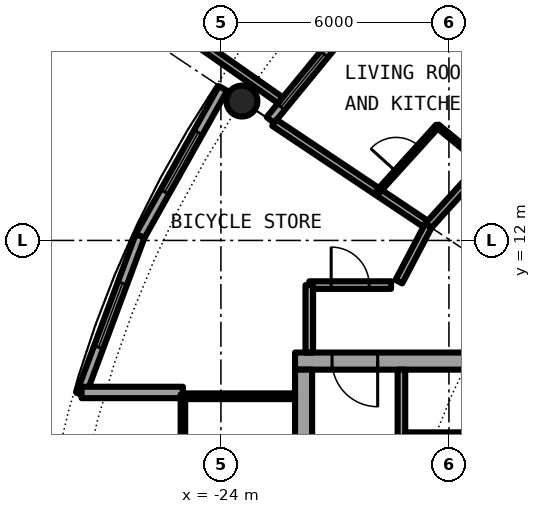
"""IFC4 building model, lengths in metres.
Left out: names, types, materials, properties, quantities, classifications, styles, units other than length and angle.
Written with IfcOpenShell. Run it as: python <this file> out.ifc"""

import sys

from ifc_helpers import new_model, si_unit, direction, frame, frame_2d, origin, origin_2d, place, context, subcontext, project, spatial, rectangle, hollow_circle, extrude, element, fill, save


model = new_model("IFC4")
c1 = context("Model", 3, precision=1e-05, world=origin(), true_north=direction((0.0, 1.0)))
c2 = subcontext(c1, "Body", "Model", "MODEL_VIEW")
j1 = project(units=[si_unit("LENGTHUNIT", "METRE"), si_unit("PLANEANGLEUNIT", "RADIAN")], contexts=[c1])
p1 = place(None, origin())
s1 = spatial("IfcSite", under=j1, at=p1, CompositionType="ELEMENT")
p2 = place(p1, origin())
s2 = spatial("IfcBuilding", under=s1, at=p2, CompositionType="ELEMENT")
p3 = place(p2, frame((0.0, 0.0, 218.8)))
s3 = spatial("IfcBuildingStorey", under=s2, at=p3, CompositionType="ELEMENT", Elevation=218.8)
p4 = place(p3, frame((-23.448, 15.667, 0.0), z_axis=(0.0, 0.0, 1.0), x_axis=(1.0, 0.0, 0.0)))
e1 = element("IfcColumn", 1, at=p4, inside=s3, PredefinedType="COLUMN", context=c2, shape_type="SweptSolid", body=[
    extrude(hollow_circle(Radius=0.406, WallThickness=0.03, at=origin_2d()), origin(), (0.0, 0.0, 1.0), 3.05),
])
p5 = place(p3, frame((-19.304, 19.304, 0.0), z_axis=(0.0, 0.0, 1.0), x_axis=(-0.634382322723, -0.773019449054, 0.0)))
e2 = element("IfcWall", 2, at=p5, inside=s3, PredefinedType="SOLIDWALL", context=c2, shape_type="SweptSolid", body=[
    extrude(rectangle(XDim=5.352, YDim=0.25, at=frame_2d((2.676, 0.0))), origin(), (0.0, 0.0, 1.0), 2.65),
])
p6 = place(p5, frame((0.841, 0.0, 0.0)))
e3 = element("IfcOpeningElement", 3, at=p6, cuts=e2, PredefinedType="OPENING", context=c2, shape_type="SweptSolid", body=[
    extrude(rectangle(XDim=1.0, YDim=2.2, at=frame_2d((0.5, 1.1))), frame((0.0, 0.135, 0.0), z_axis=(0.0, -1.0, 0.0), x_axis=(1.0, 0.0, 0.0)), (0.0, 0.0, 1.0), 0.27),
])
p7 = place(p5, frame((3.111, 0.0, 0.3)))
e4 = element("IfcOpeningElement", 4, at=p7, cuts=e2, PredefinedType="OPENING", context=c2, shape_type="SweptSolid", body=[
    extrude(rectangle(XDim=1.8, YDim=2.1, at=frame_2d((0.9, 1.05))), frame((0.0, 0.135, 0.0), z_axis=(0.0, -1.0, 0.0), x_axis=(1.0, 0.0, 0.0)), (0.0, 0.0, 1.0), 0.27),
])
p8 = place(p3, frame((-22.433, 15.688, -0.03), z_axis=(0.0, 0.0, 1.0), x_axis=(-0.819373043115, 0.573260687834, 0.0)))
e5 = element("IfcWall", 5, at=p8, inside=s3, PredefinedType="SOLIDWALL", context=c2, shape_type="SweptSolid", body=[
    extrude(rectangle(XDim=2.925, YDim=0.2, at=frame_2d((1.463, 0.0))), origin(), (0.0, 0.0, 1.0), 2.68),
])
p9 = place(p3, frame((-23.946, 16.0, 0.0), z_axis=(0.0, 0.0, 1.0), x_axis=(-0.489696356642, -0.871893042919, 0.0)))
e6 = element("IfcWall", 6, at=p9, inside=s3, PredefinedType="SOLIDWALL", context=c2, shape_type="SweptSolid", body=[
    extrude(rectangle(XDim=4.454, YDim=0.25, at=frame_2d((2.227, 0.0))), origin(), (0.0, 0.0, 1.0), 2.65),
])
p10 = place(p9, frame((1.327, 0.0, 0.3)))
e7 = element("IfcOpeningElement", 7, at=p10, cuts=e6, PredefinedType="OPENING", context=c2, shape_type="SweptSolid", body=[
    extrude(rectangle(XDim=1.8, YDim=2.1, at=frame_2d((0.9, 1.05))), frame((0.0, 0.135, 0.0), z_axis=(0.0, -1.0, 0.0), x_axis=(1.0, 0.0, 0.0)), (0.0, 0.0, 1.0), 0.27),
])
p11 = place(p3, frame((-26.127, 12.117, 0.0), z_axis=(0.0, 0.0, 1.0), x_axis=(-0.349247811493, -0.937030397675, 0.0)))
e8 = element("IfcWall", 8, at=p11, inside=s3, PredefinedType="SOLIDWALL", context=c2, shape_type="SweptSolid", body=[
    extrude(rectangle(XDim=4.452, YDim=0.25, at=frame_2d((2.226, 0.0))), origin(), (0.0, 0.0, 1.0), 2.65),
])
p12 = place(p11, frame((1.327, 0.0, 0.3)))
e9 = element("IfcOpeningElement", 9, at=p12, cuts=e8, PredefinedType="OPENING", context=c2, shape_type="SweptSolid", body=[
    extrude(rectangle(XDim=1.8, YDim=2.1, at=frame_2d((0.9, 1.05))), frame((0.0, 0.135, 0.0), z_axis=(0.0, -1.0, 0.0), x_axis=(1.0, 0.0, 0.0)), (0.0, 0.0, 1.0), 0.27),
])
p13 = place(p3, frame((-25.0, 8.0, 0.0), z_axis=(0.0, 0.0, 1.0), x_axis=(-1.0, 0.0, 0.0)))
e10 = element("IfcWall", 10, at=p13, inside=s3, PredefinedType="SOLIDWALL", context=c2, shape_type="SweptSolid", body=[
    extrude(rectangle(XDim=2.667, YDim=0.3, at=frame_2d((1.333, 0.0))), origin(), (0.0, 0.0, 1.0), 2.65),
])
p14 = place(p3, frame((-8.55, 8.825, 0.0), z_axis=(0.0, 0.0, 1.0), x_axis=(-1.0, 0.0, 0.0)))
e11 = element("IfcWall", 11, at=p14, inside=s3, PredefinedType="SHEAR", context=c2, shape_type="SweptSolid", body=[
    extrude(rectangle(XDim=13.5, YDim=0.45, at=frame_2d((6.75, 0.0))), origin(), (0.0, 0.0, 1.0), 3.05),
])
p15 = place(p14, frame((11.325, 0.0, 0.0)))
e12 = element("IfcOpeningElement", 12, at=p15, cuts=e11, PredefinedType="OPENING", context=c2, shape_type="SweptSolid", body=[
    extrude(rectangle(XDim=1.2, YDim=2.3, at=frame_2d((0.6, 1.15))), frame((0.0, 0.235, 0.0), z_axis=(0.0, -1.0, 0.0), x_axis=(1.0, 0.0, 0.0)), (0.0, 0.0, 1.0), 0.47),
])
p16 = place(p3, frame((-21.825, -8.6, 0.0), z_axis=(0.0, 0.0, 1.0), x_axis=(0.0, 1.0, 0.0)))
e13 = element("IfcWall", 13, at=p16, inside=s3, PredefinedType="SHEAR", context=c2, shape_type="SweptSolid", body=[
    extrude(rectangle(XDim=17.2, YDim=0.45, at=frame_2d((8.6, 0.0))), origin(), (0.0, 0.0, 1.0), 3.05),
])
p17 = place(p16, frame((7.7, 0.0, 0.0)))
e14 = element("IfcOpeningElement", 14, at=p17, cuts=e13, PredefinedType="OPENING", context=c2, shape_type="SweptSolid", body=[
    extrude(rectangle(XDim=1.8, YDim=2.3, at=frame_2d((0.9, 1.15))), frame((0.0, 0.235, 0.0), z_axis=(0.0, -1.0, 0.0), x_axis=(1.0, 0.0, 0.0)), (0.0, 0.0, 1.0), 0.47),
])
p18 = place(p3, frame((-19.25, 8.6, 0.0), z_axis=(0.0, 0.0, 1.0), x_axis=(0.0, -1.0, 0.0)))
e15 = element("IfcWall", 15, at=p18, inside=s3, PredefinedType="SOLIDWALL", context=c2, shape_type="SweptSolid", body=[
    extrude(rectangle(XDim=7.025, YDim=0.2, at=frame_2d((3.513, 0.0))), origin(), (0.0, 0.0, 1.0), 2.65),
])
p19 = place(p18, frame((2.35, 0.0, 0.0)))
e16 = element("IfcOpeningElement", 16, at=p19, cuts=e15, PredefinedType="OPENING", context=c2, shape_type="SweptSolid", body=[
    extrude(rectangle(XDim=1.1, YDim=2.3, at=frame_2d((0.55, 1.15))), frame((0.0, 0.11, 0.0), z_axis=(0.0, -1.0, 0.0), x_axis=(1.0, 0.0, 0.0)), (0.0, 0.0, 1.0), 0.22),
])
p20 = place(p3, frame((-15.45, 6.875, 0.0), z_axis=(0.0, 0.0, 1.0), x_axis=(-1.0, 0.0, 0.0)))
e17 = element("IfcWall", 17, at=p20, inside=s3, PredefinedType="PARTITIONING", context=c2, shape_type="SweptSolid", body=[
    extrude(rectangle(XDim=3.7, YDim=0.15, at=frame_2d((1.85, 0.0))), origin(), (0.0, 0.0, 1.0), 2.65),
])
p21 = place(p20, frame((1.4, 0.0, 0.0)))
e18 = element("IfcOpeningElement", 18, at=p21, cuts=e17, PredefinedType="OPENING", context=c2, shape_type="SweptSolid", body=[
    extrude(rectangle(XDim=0.9, YDim=2.3, at=frame_2d((0.45, 1.15))), frame((0.0, 0.085, 0.0), z_axis=(0.0, -1.0, 0.0), x_axis=(1.0, 0.0, 0.0)), (0.0, 0.0, 1.0), 0.17),
])
p22 = place(p3, frame((-22.05, 7.9, 0.0), z_axis=(0.0, 0.0, 1.0), x_axis=(-1.0, 0.0, 0.0)))
e19 = element("IfcWall", 19, at=p22, inside=s3, PredefinedType="PARTITIONING", context=c2, shape_type="SweptSolid", body=[
    extrude(rectangle(XDim=2.89, YDim=0.15, at=frame_2d((1.445, 0.0))), origin(), (0.0, 0.0, 1.0), 2.65),
])
p23 = place(p3, frame((-25.0, 7.95, 0.0), z_axis=(0.0, 0.0, 1.0), x_axis=(0.0, -1.0, 0.0)))
e20 = element("IfcWall", 20, at=p23, inside=s3, PredefinedType="PARTITIONING", context=c2, shape_type="SweptSolid", body=[
    extrude(rectangle(XDim=15.9, YDim=0.12, at=frame_2d((7.95, 0.0))), origin(), (0.0, 0.0, 1.0), 2.65),
])
p24 = place(p23, frame((0.95, 0.0, 0.1)))
e21 = element("IfcOpeningElement", 21, at=p24, cuts=e20, PredefinedType="OPENING", context=c2, shape_type="SweptSolid", body=[
    extrude(rectangle(XDim=14.0, YDim=1.85, at=frame_2d((7.0, 0.925))), frame((0.0, 0.07, 0.0), z_axis=(0.0, -1.0, 0.0), x_axis=(1.0, 0.0, 0.0)), (0.0, 0.0, 1.0), 0.14),
])
p25 = place(p3, frame((-22.595, 15.098, 0.0), z_axis=(0.0, 0.0, 1.0), x_axis=(0.831387096605, -0.55569370664, 0.0)))
e22 = element("IfcWall", 22, at=p25, inside=s3, PredefinedType="PARTITIONING", context=c2, shape_type="SweptSolid", body=[
    extrude(rectangle(XDim=4.875, YDim=0.2, at=frame_2d((2.438, 0.0))), origin(), (0.0, 0.0, 1.0), 2.65),
])
p26 = place(p3, frame((-19.21, 19.222, 0.0), z_axis=(0.0, 0.0, 1.0), x_axis=(0.706967463531, -0.707246071398, 0.0)))
e23 = element("IfcWall", 23, at=p26, inside=s3, PredefinedType="PARTITIONING", context=c2, shape_type="SweptSolid", body=[
    extrude(rectangle(XDim=3.505, YDim=0.1, at=frame_2d((1.752, 0.0))), origin(), (0.0, 0.0, 1.0), 2.65),
])
p27 = place(p26, frame((1.303, 0.0, 0.0)))
e24 = element("IfcOpeningElement", 24, at=p27, cuts=e23, PredefinedType="OPENING", context=c2, shape_type="SweptSolid", body=[
    extrude(rectangle(XDim=0.9, YDim=2.3, at=frame_2d((0.45, 1.15))), frame((0.0, 0.06, 0.0), z_axis=(0.0, -1.0, 0.0), x_axis=(1.0, 0.0, 0.0)), (0.0, 0.0, 1.0), 0.12),
])
p28 = place(p3, frame((-18.302, 15.01, 0.0), z_axis=(0.0, 0.0, 1.0), x_axis=(0.773476341377, -0.633825172528, 0.0)))
e25 = element("IfcWall", 25, at=p28, inside=s3, PredefinedType="PARTITIONING", context=c2, shape_type="SweptSolid", body=[
    extrude(rectangle(XDim=1.584, YDim=0.1, at=frame_2d((0.792, 0.0))), origin(), (0.0, 0.0, 1.0), 2.65),
])
p29 = place(p3, frame((-21.675, 10.825, 0.0), z_axis=(0.0, 0.0, 1.0), x_axis=(1.0, 0.0, 0.0)))
e26 = element("IfcWall", 26, at=p29, inside=s3, PredefinedType="PARTITIONING", context=c2, shape_type="SweptSolid", body=[
    extrude(rectangle(XDim=2.152, YDim=0.2, at=frame_2d((1.076, 0.0))), origin(), (0.0, 0.0, 1.0), 2.65),
])
p30 = place(p29, frame((0.576, 0.0, 0.0)))
e27 = element("IfcOpeningElement", 27, at=p30, cuts=e26, PredefinedType="OPENING", context=c2, shape_type="SweptSolid", body=[
    extrude(rectangle(XDim=1.0, YDim=2.3, at=frame_2d((0.5, 1.15))), frame((0.0, 0.11, 0.0), z_axis=(0.0, -1.0, 0.0), x_axis=(1.0, 0.0, 0.0)), (0.0, 0.0, 1.0), 0.22),
])
p31 = place(p3, frame((-21.675, 9.05, 0.0), z_axis=(0.0, 0.0, 1.0), x_axis=(0.0, 1.0, 0.0)))
e28 = element("IfcWall", 28, at=p31, inside=s3, PredefinedType="PARTITIONING", context=c2, shape_type="SweptSolid", body=[
    extrude(rectangle(XDim=1.775, YDim=0.2, at=frame_2d((0.887, 0.0))), origin(), (0.0, 0.0, 1.0), 2.65),
])
p32 = place(p3, frame((-18.542, 12.389, 0.0), z_axis=(0.0, 0.0, 1.0), x_axis=(0.671561669125, 0.740948665268, 0.0)))
e29 = element("IfcWall", 29, at=p32, inside=s3, PredefinedType="PARTITIONING", context=c2, shape_type="SweptSolid", body=[
    extrude(rectangle(XDim=6.544, YDim=0.2, at=frame_2d((3.272, 0.0))), origin(), (0.0, 0.0, 1.0), 2.65),
])
p33 = place(p32, frame((3.862, 0.0, 0.0)))
e30 = element("IfcOpeningElement", 30, at=p33, cuts=e29, PredefinedType="OPENING", context=c2, shape_type="SweptSolid", body=[
    extrude(rectangle(XDim=1.0, YDim=2.3, at=frame_2d((0.5, 1.15))), frame((0.0, 0.11, 0.0), z_axis=(0.0, -1.0, 0.0), x_axis=(1.0, 0.0, 0.0)), (0.0, 0.0, 1.0), 0.22),
])
p34 = place(p3, frame((-19.317, 10.915, 0.0), z_axis=(0.0, 0.0, 1.0), x_axis=(0.465359652486, 0.885121683068, 0.0)))
e31 = element("IfcWall", 31, at=p34, inside=s3, PredefinedType="PARTITIONING", context=c2, shape_type="SweptSolid", body=[
    extrude(rectangle(XDim=1.665, YDim=0.2, at=frame_2d((0.833, 0.0))), origin(), (0.0, 0.0, 1.0), 2.65),
])
p35 = place(p3, frame((-19.872, 13.278, 0.0), z_axis=(0.0, 0.0, 1.0), x_axis=(0.671637685376, 0.740879760544, 0.0)))
e32 = element("IfcWall", 32, at=p35, inside=s3, PredefinedType="PARTITIONING", context=c2, shape_type="SweptSolid", body=[
    extrude(rectangle(XDim=2.338, YDim=0.1, at=frame_2d((1.169, 0.0))), origin(), (0.0, 0.0, 1.0), 2.65),
])
p36 = place(p35, frame((0.719, 0.0, 0.0)))
e33 = element("IfcOpeningElement", 33, at=p36, cuts=e32, PredefinedType="OPENING", context=c2, shape_type="SweptSolid", body=[
    extrude(rectangle(XDim=0.9, YDim=2.3, at=frame_2d((0.45, 1.15))), frame((0.0, 0.06, 0.0), z_axis=(0.0, -1.0, 0.0), x_axis=(1.0, 0.0, 0.0)), (0.0, 0.0, 1.0), 0.12),
])
p37 = place(p7, origin())
e34 = element("IfcWindow", 34, at=p37, inside=s3, PartitioningType="SINGLE_PANEL", PredefinedType="WINDOW", context=c2, shape_type="SweptSolid", body=[
    extrude(rectangle(XDim=1.8, YDim=2.1, at=frame_2d((0.9, 1.05))), frame((0.0, 0.03, 0.0), z_axis=(0.0, -1.0, 0.0), x_axis=(1.0, 0.0, 0.0)), (0.0, 0.0, 1.0), 0.06),
])
fill(e4, e34)
p38 = place(p10, origin())
e35 = element("IfcWindow", 35, at=p38, inside=s3, PartitioningType="SINGLE_PANEL", PredefinedType="WINDOW", context=c2, shape_type="SweptSolid", body=[
    extrude(rectangle(XDim=1.8, YDim=2.1, at=frame_2d((0.9, 1.05))), frame((0.0, 0.03, 0.0), z_axis=(0.0, -1.0, 0.0), x_axis=(1.0, 0.0, 0.0)), (0.0, 0.0, 1.0), 0.06),
])
fill(e7, e35)
p39 = place(p12, origin())
e36 = element("IfcWindow", 36, at=p39, inside=s3, PartitioningType="SINGLE_PANEL", PredefinedType="WINDOW", context=c2, shape_type="SweptSolid", body=[
    extrude(rectangle(XDim=1.8, YDim=2.1, at=frame_2d((0.9, 1.05))), frame((0.0, 0.03, 0.0), z_axis=(0.0, -1.0, 0.0), x_axis=(1.0, 0.0, 0.0)), (0.0, 0.0, 1.0), 0.06),
])
fill(e9, e36)
p40 = place(p21, origin())
e37 = element("IfcDoor", 37, at=p40, inside=s3, OperationType="SINGLE_SWING_LEFT", PredefinedType="DOOR", context=c2, shape_type="SweptSolid", body=[
    extrude(rectangle(XDim=0.9, YDim=2.3, at=frame_2d((0.45, 1.15))), frame((0.0, 0.025, 0.0), z_axis=(0.0, -1.0, 0.0), x_axis=(1.0, 0.0, 0.0)), (0.0, 0.0, 1.0), 0.05),
])
fill(e18, e37)
p41 = place(p15, origin())
e38 = element("IfcDoor", 38, at=p41, inside=s3, OperationType="SINGLE_SWING_LEFT", PredefinedType="DOOR", context=c2, shape_type="SweptSolid", body=[
    extrude(rectangle(XDim=1.2, YDim=2.3, at=frame_2d((0.6, 1.15))), frame((0.0, 0.025, 0.0), z_axis=(0.0, -1.0, 0.0), x_axis=(1.0, 0.0, 0.0)), (0.0, 0.0, 1.0), 0.05),
])
fill(e12, e38)
p42 = place(p24, origin())
e39 = element("IfcWindow", 39, at=p42, inside=s3, PartitioningType="SINGLE_PANEL", PredefinedType="WINDOW", context=c2, shape_type="SweptSolid", body=[
    extrude(rectangle(XDim=14.0, YDim=1.85, at=frame_2d((7.0, 0.925))), frame((0.0, 0.03, 0.0), z_axis=(0.0, -1.0, 0.0), x_axis=(1.0, 0.0, 0.0)), (0.0, 0.0, 1.0), 0.06),
])
fill(e21, e39)
p43 = place(p36, origin())
e40 = element("IfcDoor", 40, at=p43, inside=s3, OperationType="SINGLE_SWING_LEFT", PredefinedType="DOOR", context=c2, shape_type="SweptSolid", body=[
    extrude(rectangle(XDim=0.9, YDim=2.3, at=frame_2d((0.45, 1.15))), frame((0.0, 0.025, 0.0), z_axis=(0.0, -1.0, 0.0), x_axis=(1.0, 0.0, 0.0)), (0.0, 0.0, 1.0), 0.05),
])
fill(e33, e40)
p44 = place(p30, origin())
e41 = element("IfcDoor", 41, at=p44, inside=s3, OperationType="SINGLE_SWING_LEFT", PredefinedType="DOOR", context=c2, shape_type="SweptSolid", body=[
    extrude(rectangle(XDim=1.0, YDim=2.3, at=frame_2d((0.5, 1.15))), frame((0.0, 0.025, 0.0), z_axis=(0.0, -1.0, 0.0), x_axis=(1.0, 0.0, 0.0)), (0.0, 0.0, 1.0), 0.05),
])
fill(e27, e41)
save(model, sys.argv[1])
